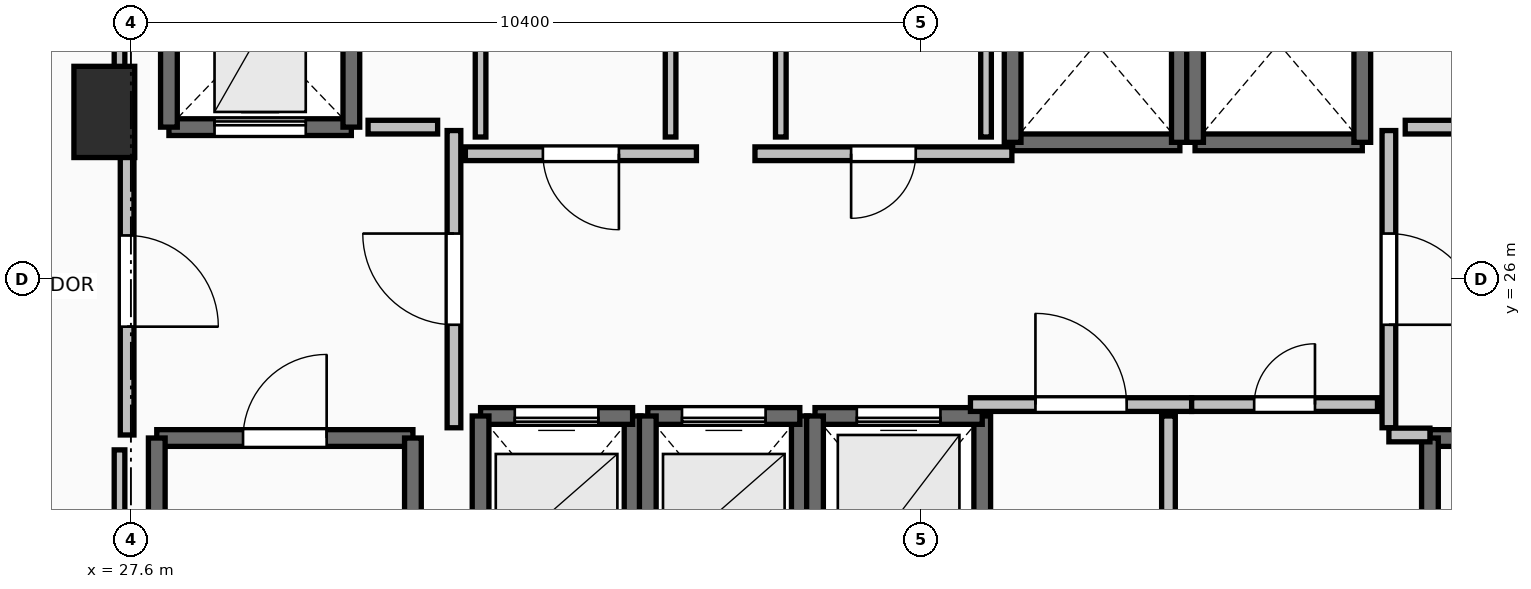
"""IFC4 building model, lengths in metres.
Left out: names, types, materials, properties, quantities, classifications, styles, units other than length and angle.
Written with IfcOpenShell. Run it as: python <this file> out.ifc"""

import sys

from ifc_helpers import new_model, si_unit, direction, frame, frame_2d, origin, origin_2d, place, context, subcontext, project, spatial, rectangle, extrude, element, fill, save


model = new_model("IFC4")
c1 = context("Model", 3, precision=1e-05, world=origin(), true_north=direction((0.0, 1.0)))
c2 = subcontext(c1, "Body", "Model", "MODEL_VIEW")
j1 = project(units=[si_unit("LENGTHUNIT", "METRE"), si_unit("PLANEANGLEUNIT", "RADIAN")], contexts=[c1])
p1 = place(None, origin())
s1 = spatial("IfcSite", under=j1, at=p1, CompositionType="ELEMENT")
p2 = place(p1, origin())
s2 = spatial("IfcBuilding", under=s1, at=p2, CompositionType="ELEMENT")
p3 = place(p2, frame((0.0, 0.0, 143.1)))
s3 = spatial("IfcBuildingStorey", under=s2, at=p3, CompositionType="ELEMENT", Elevation=143.1)
p4 = place(p3, frame((27.25, 28.2, 0.0), z_axis=(0.0, 0.0, 1.0), x_axis=(1.0, 0.0, 0.0)))
e1 = element("IfcColumn", 1, at=p4, inside=s3, PredefinedType="PILASTER", context=c2, shape_type="SweptSolid", body=[
    extrude(rectangle(XDim=0.8, YDim=1.2, at=origin_2d()), origin(), (0.0, 0.0, 1.0), 3.5),
])
p5 = place(p3, frame((27.94, 23.91, 0.0), z_axis=(0.0, 0.0, 1.0), x_axis=(1.0, 0.0, 0.0)))
e2 = element("IfcWall", 2, at=p5, inside=s3, PredefinedType="SOLIDWALL", context=c2, shape_type="SweptSolid", body=[
    extrude(rectangle(XDim=3.37, YDim=0.22, at=frame_2d((1.685, 0.0))), origin(), (0.0, 0.0, 1.0), 3.24),
])
p6 = place(p5, frame((1.135, 0.0, 0.0)))
e3 = element("IfcOpeningElement", 3, at=p6, cuts=e2, PredefinedType="OPENING", context=c2, shape_type="SweptSolid", body=[
    extrude(rectangle(XDim=1.1, YDim=2.15, at=frame_2d((0.55, 1.075))), frame((0.0, 0.125, 0.0), z_axis=(0.0, -1.0, 0.0), x_axis=(1.0, 0.0, 0.0)), (0.0, 0.0, 1.0), 0.25),
])
for number, where, z_axis, x_axis in (
    (4, (31.31, 23.91, 0.0), (0.0, 0.0, 1.0), (0.0, -1.0, 0.0)),
    (5, (27.94, 16.49, 0.0), (0.0, 0.0, 1.0), (0.0, 1.0, 0.0)),
):
    element("IfcWall", number, at=place(p3, frame(where, z_axis=z_axis, x_axis=x_axis)), inside=s3, PredefinedType="SOLIDWALL", context=c2, shape_type="SweptSolid", body=[
        extrude(rectangle(XDim=7.42, YDim=0.22, at=frame_2d((3.71, 0.0))), origin(), (0.0, 0.0, 1.0), 3.24),
    ])
p7 = place(p3, frame((44.69, 23.91, 0.0), z_axis=(0.0, 0.0, 1.0), x_axis=(1.0, 0.0, 0.0)))
e6 = element("IfcWall", 6, at=p7, inside=s3, PredefinedType="SOLIDWALL", context=c2, shape_type="SweptSolid", body=[
    extrude(rectangle(XDim=3.37, YDim=0.22, at=frame_2d((1.685, 0.0))), origin(), (0.0, 0.0, 1.0), 3.24),
])
p8 = place(p7, frame((1.135, 0.0, 0.0)))
e7 = element("IfcOpeningElement", 7, at=p8, cuts=e6, PredefinedType="OPENING", context=c2, shape_type="SweptSolid", body=[
    extrude(rectangle(XDim=1.1, YDim=2.15, at=frame_2d((0.55, 1.075))), frame((0.0, 0.125, 0.0), z_axis=(0.0, -1.0, 0.0), x_axis=(1.0, 0.0, 0.0)), (0.0, 0.0, 1.0), 0.25),
])
p9 = place(p3, frame((44.69, 16.49, 0.0), z_axis=(0.0, 0.0, 1.0), x_axis=(0.0, 1.0, 0.0)))
e8 = element("IfcWall", 8, at=p9, inside=s3, PredefinedType="SOLIDWALL", context=c2, shape_type="SweptSolid", body=[
    extrude(rectangle(XDim=7.42, YDim=0.22, at=frame_2d((3.71, 0.0))), origin(), (0.0, 0.0, 1.0), 3.24),
])
p10 = place(p3, frame((34.2, 21.8, 0.0), z_axis=(0.0, 0.0, 1.0), x_axis=(0.0, 1.0, 0.0)))
e9 = element("IfcWall", 9, at=p10, inside=s3, PredefinedType="SOLIDWALL", context=c2, shape_type="SweptSolid", body=[
    extrude(rectangle(XDim=2.4, YDim=0.22, at=frame_2d((1.2, 0.0))), origin(), (0.0, 0.0, 1.0), 3.24),
])
p11 = place(p3, frame((34.2, 24.2, 0.0), z_axis=(0.0, 0.0, 1.0), x_axis=(-1.0, 0.0, 0.0)))
e10 = element("IfcWall", 10, at=p11, inside=s3, PredefinedType="SOLIDWALL", context=c2, shape_type="SweptSolid", body=[
    extrude(rectangle(XDim=2.0, YDim=0.22, at=frame_2d((1.0, 0.0))), origin(), (0.0, 0.0, 1.0), 3.24),
])
p12 = place(p11, frame((0.45, 0.0, 0.0)))
e11 = element("IfcOpeningElement", 11, at=p12, cuts=e10, PredefinedType="OPENING", context=c2, shape_type="SweptSolid", body=[
    extrude(rectangle(XDim=1.1, YDim=2.2, at=frame_2d((0.55, 1.1))), frame((0.0, 0.125, 0.0), z_axis=(0.0, -1.0, 0.0), x_axis=(1.0, 0.0, 0.0)), (0.0, 0.0, 1.0), 0.25),
])
for number, where, z_axis, x_axis in (
    (12, (32.2, 24.2, 0.0), (0.0, 0.0, 1.0), (0.0, -1.0, 0.0)),
    (13, (36.4, 21.8, 0.0), (0.0, 0.0, 1.0), (0.0, 1.0, 0.0)),
):
    element("IfcWall", number, at=place(p3, frame(where, z_axis=z_axis, x_axis=x_axis)), inside=s3, PredefinedType="SOLIDWALL", context=c2, shape_type="SweptSolid", body=[
        extrude(rectangle(XDim=2.4, YDim=0.22, at=frame_2d((1.2, 0.0))), origin(), (0.0, 0.0, 1.0), 3.24),
    ])
p13 = place(p3, frame((36.4, 24.2, 0.0), z_axis=(0.0, 0.0, 1.0), x_axis=(-1.0, 0.0, 0.0)))
e14 = element("IfcWall", 14, at=p13, inside=s3, PredefinedType="SOLIDWALL", context=c2, shape_type="SweptSolid", body=[
    extrude(rectangle(XDim=2.0, YDim=0.22, at=frame_2d((1.0, 0.0))), origin(), (0.0, 0.0, 1.0), 3.24),
])
p14 = place(p13, frame((0.45, 0.0, 0.0)))
e15 = element("IfcOpeningElement", 15, at=p14, cuts=e14, PredefinedType="OPENING", context=c2, shape_type="SweptSolid", body=[
    extrude(rectangle(XDim=1.1, YDim=2.2, at=frame_2d((0.55, 1.1))), frame((0.0, 0.125, 0.0), z_axis=(0.0, -1.0, 0.0), x_axis=(1.0, 0.0, 0.0)), (0.0, 0.0, 1.0), 0.25),
])
p15 = place(p3, frame((34.4, 24.2, 0.0), z_axis=(0.0, 0.0, 1.0), x_axis=(0.0, -1.0, 0.0)))
e16 = element("IfcWall", 16, at=p15, inside=s3, PredefinedType="SOLIDWALL", context=c2, shape_type="SweptSolid", body=[
    extrude(rectangle(XDim=2.4, YDim=0.22, at=frame_2d((1.2, 0.0))), origin(), (0.0, 0.0, 1.0), 3.24),
])
p16 = place(p3, frame((38.8, 21.6, 0.0), z_axis=(0.0, 0.0, 1.0), x_axis=(0.0, 1.0, 0.0)))
e17 = element("IfcWall", 17, at=p16, inside=s3, PredefinedType="SOLIDWALL", context=c2, shape_type="SweptSolid", body=[
    extrude(rectangle(XDim=2.6, YDim=0.22, at=frame_2d((1.3, 0.0))), origin(), (0.0, 0.0, 1.0), 3.24),
])
p17 = place(p3, frame((38.8, 24.2, 0.0), z_axis=(0.0, 0.0, 1.0), x_axis=(-1.0, 0.0, 0.0)))
e18 = element("IfcWall", 18, at=p17, inside=s3, PredefinedType="SOLIDWALL", context=c2, shape_type="SweptSolid", body=[
    extrude(rectangle(XDim=2.2, YDim=0.22, at=frame_2d((1.1, 0.0))), origin(), (0.0, 0.0, 1.0), 3.24),
])
p18 = place(p17, frame((0.55, 0.0, 0.0)))
e19 = element("IfcOpeningElement", 19, at=p18, cuts=e18, PredefinedType="OPENING", context=c2, shape_type="SweptSolid", body=[
    extrude(rectangle(XDim=1.1, YDim=2.2, at=frame_2d((0.55, 1.1))), frame((0.0, 0.125, 0.0), z_axis=(0.0, -1.0, 0.0), x_axis=(1.0, 0.0, 0.0)), (0.0, 0.0, 1.0), 0.25),
])
p19 = place(p3, frame((36.6, 24.2, 0.0), z_axis=(0.0, 0.0, 1.0), x_axis=(0.0, -1.0, 0.0)))
e20 = element("IfcWall", 20, at=p19, inside=s3, PredefinedType="SOLIDWALL", context=c2, shape_type="SweptSolid", body=[
    extrude(rectangle(XDim=2.6, YDim=0.22, at=frame_2d((1.3, 0.0))), origin(), (0.0, 0.0, 1.0), 3.24),
])
p20 = place(p3, frame((39.2, 27.8, 0.0), z_axis=(0.0, 0.0, 1.0), x_axis=(1.0, 0.0, 0.0)))
e21 = element("IfcWall", 21, at=p20, inside=s3, PredefinedType="SOLIDWALL", context=c2, shape_type="SweptSolid", body=[
    extrude(rectangle(XDim=2.2, YDim=0.22, at=frame_2d((1.1, 0.0))), origin(), (0.0, 0.0, 1.0), 3.24),
])
for number, where, z_axis, x_axis in (
    (22, (41.4, 27.8, 0.0), (0.0, 0.0, 1.0), (0.0, 1.0, 0.0)),
    (23, (39.2, 30.4, 0.0), (0.0, 0.0, 1.0), (0.0, -1.0, 0.0)),
):
    element("IfcWall", number, at=place(p3, frame(where, z_axis=z_axis, x_axis=x_axis)), inside=s3, PredefinedType="SOLIDWALL", context=c2, shape_type="SweptSolid", body=[
        extrude(rectangle(XDim=2.6, YDim=0.22, at=frame_2d((1.3, 0.0))), origin(), (0.0, 0.0, 1.0), 3.24),
    ])
p21 = place(p3, frame((41.6, 27.8, 0.0), z_axis=(0.0, 0.0, 1.0), x_axis=(1.0, 0.0, 0.0)))
e24 = element("IfcWall", 24, at=p21, inside=s3, PredefinedType="SOLIDWALL", context=c2, shape_type="SweptSolid", body=[
    extrude(rectangle(XDim=2.2, YDim=0.22, at=frame_2d((1.1, 0.0))), origin(), (0.0, 0.0, 1.0), 3.24),
])
for number, where, z_axis, x_axis in (
    (25, (43.8, 27.8, 0.0), (0.0, 0.0, 1.0), (0.0, 1.0, 0.0)),
    (26, (41.6, 30.4, 0.0), (0.0, 0.0, 1.0), (0.0, -1.0, 0.0)),
):
    element("IfcWall", number, at=place(p3, frame(where, z_axis=z_axis, x_axis=x_axis)), inside=s3, PredefinedType="SOLIDWALL", context=c2, shape_type="SweptSolid", body=[
        extrude(rectangle(XDim=2.6, YDim=0.22, at=frame_2d((1.3, 0.0))), origin(), (0.0, 0.0, 1.0), 3.24),
    ])
p22 = place(p3, frame((28.1, 28.0, 0.0), z_axis=(0.0, 0.0, 1.0), x_axis=(1.0, 0.0, 0.0)))
e27 = element("IfcWall", 27, at=p22, inside=s3, PredefinedType="SHEAR", context=c2, shape_type="SweptSolid", body=[
    extrude(rectangle(XDim=2.4, YDim=0.22, at=frame_2d((1.2, 0.0))), origin(), (0.0, 0.0, 1.0), 3.24),
])
p23 = place(p22, frame((0.6, 0.0, 0.0)))
e28 = element("IfcOpeningElement", 28, at=p23, cuts=e27, PredefinedType="OPENING", context=c2, shape_type="SweptSolid", body=[
    extrude(rectangle(XDim=1.2, YDim=2.2, at=frame_2d((0.6, 1.1))), frame((0.0, 0.125, 0.0), z_axis=(0.0, -1.0, 0.0), x_axis=(1.0, 0.0, 0.0)), (0.0, 0.0, 1.0), 0.25),
])
for number, where, z_axis, x_axis in (
    (29, (30.5, 28.0, 0.0), (0.0, 0.0, 1.0), (0.0, 1.0, 0.0)),
    (30, (28.1, 30.5, 0.0), (0.0, 0.0, 1.0), (0.0, -1.0, 0.0)),
):
    element("IfcWall", number, at=place(p3, frame(where, z_axis=z_axis, x_axis=x_axis)), inside=s3, PredefinedType="SHEAR", context=c2, shape_type="SweptSolid", body=[
        extrude(rectangle(XDim=2.5, YDim=0.22, at=frame_2d((1.25, 0.0))), origin(), (0.0, 0.0, 1.0), 3.24),
    ])
p24 = place(p3, frame((31.85, 24.045, 0.0), z_axis=(0.0, 0.0, 1.0), x_axis=(0.0, 1.0, 0.0)))
e31 = element("IfcWall", 31, at=p24, inside=s3, PredefinedType="PARTITIONING", context=c2, shape_type="SweptSolid", body=[
    extrude(rectangle(XDim=3.91, YDim=0.18, at=frame_2d((1.955, 0.0))), origin(), (0.0, 0.0, 1.0), 3.24),
])
p25 = place(p24, frame((1.355, 0.0, 0.0)))
e32 = element("IfcOpeningElement", 32, at=p25, cuts=e31, PredefinedType="OPENING", context=c2, shape_type="SweptSolid", body=[
    extrude(rectangle(XDim=1.2, YDim=2.15, at=frame_2d((0.6, 1.075))), frame((0.0, 0.105, 0.0), z_axis=(0.0, -1.0, 0.0), x_axis=(1.0, 0.0, 0.0)), (0.0, 0.0, 1.0), 0.21),
])
p26 = place(p3, frame((27.55, 28.0, 0.0), z_axis=(0.0, 0.0, 1.0), x_axis=(0.0, -1.0, 0.0)))
e33 = element("IfcWall", 33, at=p26, inside=s3, PredefinedType="PARTITIONING", context=c2, shape_type="SweptSolid", body=[
    extrude(rectangle(XDim=4.05, YDim=0.18, at=frame_2d((2.025, 0.0))), origin(), (0.0, 0.0, 1.0), 3.24),
])
p27 = place(p26, frame((1.425, 0.0, 0.0)))
e34 = element("IfcOpeningElement", 34, at=p27, cuts=e33, PredefinedType="OPENING", context=c2, shape_type="SweptSolid", body=[
    extrude(rectangle(XDim=1.2, YDim=2.15, at=frame_2d((0.6, 1.075))), frame((0.0, 0.105, 0.0), z_axis=(0.0, -1.0, 0.0), x_axis=(1.0, 0.0, 0.0)), (0.0, 0.0, 1.0), 0.21),
])
p28 = place(p3, frame((44.15, 27.955, 0.0), z_axis=(0.0, 0.0, 1.0), x_axis=(0.0, -1.0, 0.0)))
e35 = element("IfcWall", 35, at=p28, inside=s3, PredefinedType="PARTITIONING", context=c2, shape_type="SweptSolid", body=[
    extrude(rectangle(XDim=3.91, YDim=0.18, at=frame_2d((1.955, 0.0))), origin(), (0.0, 0.0, 1.0), 3.24),
])
p29 = place(p28, frame((1.355, 0.0, 0.0)))
e36 = element("IfcOpeningElement", 36, at=p29, cuts=e35, PredefinedType="OPENING", context=c2, shape_type="SweptSolid", body=[
    extrude(rectangle(XDim=1.2, YDim=2.15, at=frame_2d((0.6, 1.075))), frame((0.0, 0.105, 0.0), z_axis=(0.0, -1.0, 0.0), x_axis=(1.0, 0.0, 0.0)), (0.0, 0.0, 1.0), 0.21),
])
p30 = place(p3, frame((44.15, 23.95, 0.0), z_axis=(0.0, 0.0, 1.0), x_axis=(1.0, 0.0, 0.0)))
e37 = element("IfcWall", 37, at=p30, inside=s3, PredefinedType="PARTITIONING", context=c2, shape_type="SweptSolid", body=[
    extrude(rectangle(XDim=0.54, YDim=0.18, at=frame_2d((0.27, 0.0))), origin(), (0.0, 0.0, 1.0), 3.24),
])
p31 = place(p3, frame((38.645, 24.35, 0.0), z_axis=(0.0, 0.0, 1.0), x_axis=(1.0, 0.0, 0.0)))
e38 = element("IfcWall", 38, at=p31, inside=s3, PredefinedType="PARTITIONING", context=c2, shape_type="SweptSolid", body=[
    extrude(rectangle(XDim=2.91, YDim=0.18, at=frame_2d((1.455, 0.0))), origin(), (0.0, 0.0, 1.0), 3.24),
])
p32 = place(p31, frame((0.855, 0.0, 0.0)))
e39 = element("IfcOpeningElement", 39, at=p32, cuts=e38, PredefinedType="OPENING", context=c2, shape_type="SweptSolid", body=[
    extrude(rectangle(XDim=1.2, YDim=2.15, at=frame_2d((0.6, 1.075))), frame((0.0, 0.105, 0.0), z_axis=(0.0, -1.0, 0.0), x_axis=(1.0, 0.0, 0.0)), (0.0, 0.0, 1.0), 0.21),
])
p33 = place(p3, frame((41.555, 24.35, 0.0), z_axis=(0.0, 0.0, 1.0), x_axis=(1.0, 0.0, 0.0)))
e40 = element("IfcWall", 40, at=p33, inside=s3, PredefinedType="PARTITIONING", context=c2, shape_type="SweptSolid", body=[
    extrude(rectangle(XDim=2.445, YDim=0.18, at=frame_2d((1.223, 0.0))), origin(), (0.0, 0.0, 1.0), 3.24),
])
p34 = place(p33, frame((0.823, 0.0, 0.0)))
e41 = element("IfcOpeningElement", 41, at=p34, cuts=e40, PredefinedType="OPENING", context=c2, shape_type="SweptSolid", body=[
    extrude(rectangle(XDim=0.8, YDim=2.05, at=frame_2d((0.4, 1.025))), frame((0.0, 0.105, 0.0), z_axis=(0.0, -1.0, 0.0), x_axis=(1.0, 0.0, 0.0)), (0.0, 0.0, 1.0), 0.21),
])
p35 = place(p3, frame((35.04, 27.65, 0.0), z_axis=(0.0, 0.0, 1.0), x_axis=(-1.0, 0.0, 0.0)))
e42 = element("IfcWall", 42, at=p35, inside=s3, PredefinedType="PARTITIONING", context=c2, shape_type="SweptSolid", body=[
    extrude(rectangle(XDim=3.04, YDim=0.18, at=frame_2d((1.52, 0.0))), origin(), (0.0, 0.0, 1.0), 3.24),
])
p36 = place(p35, frame((1.02, 0.0, 0.0)))
e43 = element("IfcOpeningElement", 43, at=p36, cuts=e42, PredefinedType="OPENING", context=c2, shape_type="SweptSolid", body=[
    extrude(rectangle(XDim=1.0, YDim=2.15, at=frame_2d((0.5, 1.075))), frame((0.0, 0.105, 0.0), z_axis=(0.0, -1.0, 0.0), x_axis=(1.0, 0.0, 0.0)), (0.0, 0.0, 1.0), 0.21),
])
p37 = place(p3, frame((39.19, 27.65, 0.0), z_axis=(0.0, 0.0, 1.0), x_axis=(-1.0, 0.0, 0.0)))
e44 = element("IfcWall", 44, at=p37, inside=s3, PredefinedType="PARTITIONING", context=c2, shape_type="SweptSolid", body=[
    extrude(rectangle(XDim=3.38, YDim=0.18, at=frame_2d((1.69, 0.0))), origin(), (0.0, 0.0, 1.0), 3.24),
])
p38 = place(p37, frame((1.265, 0.0, 0.0)))
e45 = element("IfcOpeningElement", 45, at=p38, cuts=e44, PredefinedType="OPENING", context=c2, shape_type="SweptSolid", body=[
    extrude(rectangle(XDim=0.85, YDim=2.1, at=frame_2d((0.425, 1.05))), frame((0.0, 0.105, 0.0), z_axis=(0.0, -1.0, 0.0), x_axis=(1.0, 0.0, 0.0)), (0.0, 0.0, 1.0), 0.21),
])
p39 = place(p3, frame((41.25, 16.32, 0.0), z_axis=(0.0, 0.0, 1.0), x_axis=(0.0, 1.0, 0.0)))
e46 = element("IfcWall", 46, at=p39, inside=s3, PredefinedType="PARTITIONING", context=c2, shape_type="SweptSolid", body=[
    extrude(rectangle(XDim=7.88, YDim=0.18, at=frame_2d((3.94, 0.0))), origin(), (0.0, 0.0, 1.0), 3.24),
])
p40 = place(p39, frame((3.54, 0.0, 0.0)))
e47 = element("IfcOpeningElement", 47, at=p40, cuts=e46, PredefinedType="OPENING", context=c2, shape_type="SweptSolid", body=[
    extrude(rectangle(XDim=0.8, YDim=2.05, at=frame_2d((0.4, 1.025))), frame((0.0, 0.105, 0.0), z_axis=(0.0, -1.0, 0.0), x_axis=(1.0, 0.0, 0.0)), (0.0, 0.0, 1.0), 0.21),
])
for number, where, z_axis, x_axis in (
    (48, (31.635, 28.0, 0.0), (0.0, 0.0, 1.0), (-1.0, 0.0, 0.0)),
    (49, (45.28, 28.0, 0.0), (0.0, 0.0, 1.0), (-1.0, 0.0, 0.0)),
):
    element("IfcWall", number, at=place(p3, frame(where, z_axis=z_axis, x_axis=x_axis)), inside=s3, PredefinedType="PARTITIONING", context=c2, shape_type="SweptSolid", body=[
        extrude(rectangle(XDim=0.915, YDim=0.18, at=frame_2d((0.458, 0.0))), origin(), (0.0, 0.0, 1.0), 3.24),
    ])
for number, where, z_axis, x_axis in (
    (50, (32.2, 30.26, 0.0), (0.0, 0.0, 1.0), (0.0, -1.0, 0.0)),
    (51, (34.7, 27.87, 0.0), (0.0, 0.0, 1.0), (0.0, 1.0, 0.0)),
):
    element("IfcWall", number, at=place(p3, frame(where, z_axis=z_axis, x_axis=x_axis)), inside=s3, PredefinedType="PARTITIONING", context=c2, shape_type="SweptSolid", body=[
        extrude(rectangle(XDim=2.39, YDim=0.14, at=frame_2d((1.195, 0.0))), origin(), (0.0, 0.0, 1.0), 3.24),
    ])
p41 = place(p3, frame((36.15, 30.03, 0.0), z_axis=(0.0, 0.0, 1.0), x_axis=(0.0, -1.0, 0.0)))
e52 = element("IfcWall", 52, at=p41, inside=s3, PredefinedType="PARTITIONING", context=c2, shape_type="SweptSolid", body=[
    extrude(rectangle(XDim=2.16, YDim=0.14, at=frame_2d((1.08, 0.0))), origin(), (0.0, 0.0, 1.0), 3.24),
])
p42 = place(p3, frame((38.85, 27.87, 0.0), z_axis=(0.0, 0.0, 1.0), x_axis=(0.0, 1.0, 0.0)))
e53 = element("IfcWall", 53, at=p42, inside=s3, PredefinedType="PARTITIONING", context=c2, shape_type="SweptSolid", body=[
    extrude(rectangle(XDim=2.39, YDim=0.14, at=frame_2d((1.195, 0.0))), origin(), (0.0, 0.0, 1.0), 3.24),
])
p43 = place(p3, frame((27.45, 33.45, 0.0), z_axis=(0.0, 0.0, 1.0), x_axis=(0.0, -1.0, 0.0)))
e54 = element("IfcWall", 54, at=p43, inside=s3, PredefinedType="PARTITIONING", context=c2, shape_type="SweptSolid", body=[
    extrude(rectangle(XDim=5.254, YDim=0.14, at=frame_2d((2.627, 0.0))), origin(), (0.0, 0.0, 1.0), 2.432),
])
p44 = place(p3, frame((27.45, 23.754, 0.0), z_axis=(0.0, 0.0, 1.0), x_axis=(0.0, -1.0, 0.0)))
e55 = element("IfcWall", 55, at=p44, inside=s3, PredefinedType="PARTITIONING", context=c2, shape_type="SweptSolid", body=[
    extrude(rectangle(XDim=7.514, YDim=0.14, at=frame_2d((3.757, 0.0))), origin(), (0.0, 0.0, 1.0), 2.432),
])
p45 = place(p6, origin())
e56 = element("IfcDoor", 56, at=p45, inside=s3, OperationType="SINGLE_SWING_RIGHT", PredefinedType="DOOR", context=c2, shape_type="SweptSolid", body=[
    extrude(rectangle(XDim=1.1, YDim=2.15, at=frame_2d((0.55, 1.075))), frame((0.0, 0.025, 0.0), z_axis=(0.0, -1.0, 0.0), x_axis=(1.0, 0.0, 0.0)), (0.0, 0.0, 1.0), 0.05),
])
fill(e3, e56)
p46 = place(p12, origin())
e57 = element("IfcDoor", 57, at=p46, inside=s3, OperationType="SLIDING_TO_LEFT", PredefinedType="DOOR", context=c2, shape_type="SweptSolid", body=[
    extrude(rectangle(XDim=1.1, YDim=2.2, at=frame_2d((0.55, 1.1))), frame((0.0, 0.025, 0.0), z_axis=(0.0, -1.0, 0.0), x_axis=(1.0, 0.0, 0.0)), (0.0, 0.0, 1.0), 0.05),
])
fill(e11, e57)
p47 = place(p14, origin())
e58 = element("IfcDoor", 58, at=p47, inside=s3, OperationType="SLIDING_TO_LEFT", PredefinedType="DOOR", context=c2, shape_type="SweptSolid", body=[
    extrude(rectangle(XDim=1.1, YDim=2.2, at=frame_2d((0.55, 1.1))), frame((0.0, 0.025, 0.0), z_axis=(0.0, -1.0, 0.0), x_axis=(1.0, 0.0, 0.0)), (0.0, 0.0, 1.0), 0.05),
])
fill(e15, e58)
p48 = place(p18, origin())
e59 = element("IfcDoor", 59, at=p48, inside=s3, OperationType="SLIDING_TO_LEFT", PredefinedType="DOOR", context=c2, shape_type="SweptSolid", body=[
    extrude(rectangle(XDim=1.1, YDim=2.2, at=frame_2d((0.55, 1.1))), frame((0.0, 0.025, 0.0), z_axis=(0.0, -1.0, 0.0), x_axis=(1.0, 0.0, 0.0)), (0.0, 0.0, 1.0), 0.05),
])
fill(e19, e59)
p49 = place(p23, origin())
e60 = element("IfcDoor", 60, at=p49, inside=s3, OperationType="SLIDING_TO_LEFT", PredefinedType="DOOR", context=c2, shape_type="SweptSolid", body=[
    extrude(rectangle(XDim=1.2, YDim=2.2, at=frame_2d((0.6, 1.1))), frame((0.0, 0.025, 0.0), z_axis=(0.0, -1.0, 0.0), x_axis=(1.0, 0.0, 0.0)), (0.0, 0.0, 1.0), 0.05),
])
fill(e28, e60)
p50 = place(p25, origin())
e61 = element("IfcDoor", 61, at=p50, inside=s3, OperationType="SINGLE_SWING_RIGHT", PredefinedType="DOOR", context=c2, shape_type="SweptSolid", body=[
    extrude(rectangle(XDim=1.2, YDim=2.15, at=frame_2d((0.6, 1.075))), frame((0.0, 0.025, 0.0), z_axis=(0.0, -1.0, 0.0), x_axis=(1.0, 0.0, 0.0)), (0.0, 0.0, 1.0), 0.05),
])
fill(e32, e61)
p51 = place(p27, origin())
e62 = element("IfcDoor", 62, at=p51, inside=s3, OperationType="SINGLE_SWING_RIGHT", PredefinedType="DOOR", context=c2, shape_type="SweptSolid", body=[
    extrude(rectangle(XDim=1.2, YDim=2.15, at=frame_2d((0.6, 1.075))), frame((0.0, 0.025, 0.0), z_axis=(0.0, -1.0, 0.0), x_axis=(1.0, 0.0, 0.0)), (0.0, 0.0, 1.0), 0.05),
])
fill(e34, e62)
p52 = place(p29, origin())
e63 = element("IfcDoor", 63, at=p52, inside=s3, OperationType="SINGLE_SWING_RIGHT", PredefinedType="DOOR", context=c2, shape_type="SweptSolid", body=[
    extrude(rectangle(XDim=1.2, YDim=2.15, at=frame_2d((0.6, 1.075))), frame((0.0, 0.025, 0.0), z_axis=(0.0, -1.0, 0.0), x_axis=(1.0, 0.0, 0.0)), (0.0, 0.0, 1.0), 0.05),
])
fill(e36, e63)
p53 = place(p32, origin())
e64 = element("IfcDoor", 64, at=p53, inside=s3, OperationType="SINGLE_SWING_LEFT", PredefinedType="DOOR", context=c2, shape_type="SweptSolid", body=[
    extrude(rectangle(XDim=1.2, YDim=2.15, at=frame_2d((0.6, 1.075))), frame((0.0, 0.025, 0.0), z_axis=(0.0, -1.0, 0.0), x_axis=(1.0, 0.0, 0.0)), (0.0, 0.0, 1.0), 0.05),
])
fill(e39, e64)
p54 = place(p34, origin())
e65 = element("IfcDoor", 65, at=p54, inside=s3, OperationType="SINGLE_SWING_RIGHT", PredefinedType="DOOR", context=c2, shape_type="SweptSolid", body=[
    extrude(rectangle(XDim=0.8, YDim=2.05, at=frame_2d((0.4, 1.025))), frame((0.0, 0.025, 0.0), z_axis=(0.0, -1.0, 0.0), x_axis=(1.0, 0.0, 0.0)), (0.0, 0.0, 1.0), 0.05),
])
fill(e41, e65)
p55 = place(p36, origin())
e66 = element("IfcDoor", 66, at=p55, inside=s3, OperationType="SINGLE_SWING_LEFT", PredefinedType="DOOR", context=c2, shape_type="SweptSolid", body=[
    extrude(rectangle(XDim=1.0, YDim=2.15, at=frame_2d((0.5, 1.075))), frame((0.0, 0.025, 0.0), z_axis=(0.0, -1.0, 0.0), x_axis=(1.0, 0.0, 0.0)), (0.0, 0.0, 1.0), 0.05),
])
fill(e43, e66)
p56 = place(p38, origin())
e67 = element("IfcDoor", 67, at=p56, inside=s3, OperationType="SINGLE_SWING_RIGHT", PredefinedType="DOOR", context=c2, shape_type="SweptSolid", body=[
    extrude(rectangle(XDim=0.85, YDim=2.1, at=frame_2d((0.425, 1.05))), frame((0.0, 0.025, 0.0), z_axis=(0.0, -1.0, 0.0), x_axis=(1.0, 0.0, 0.0)), (0.0, 0.0, 1.0), 0.05),
])
fill(e45, e67)
save(model, sys.argv[1])
